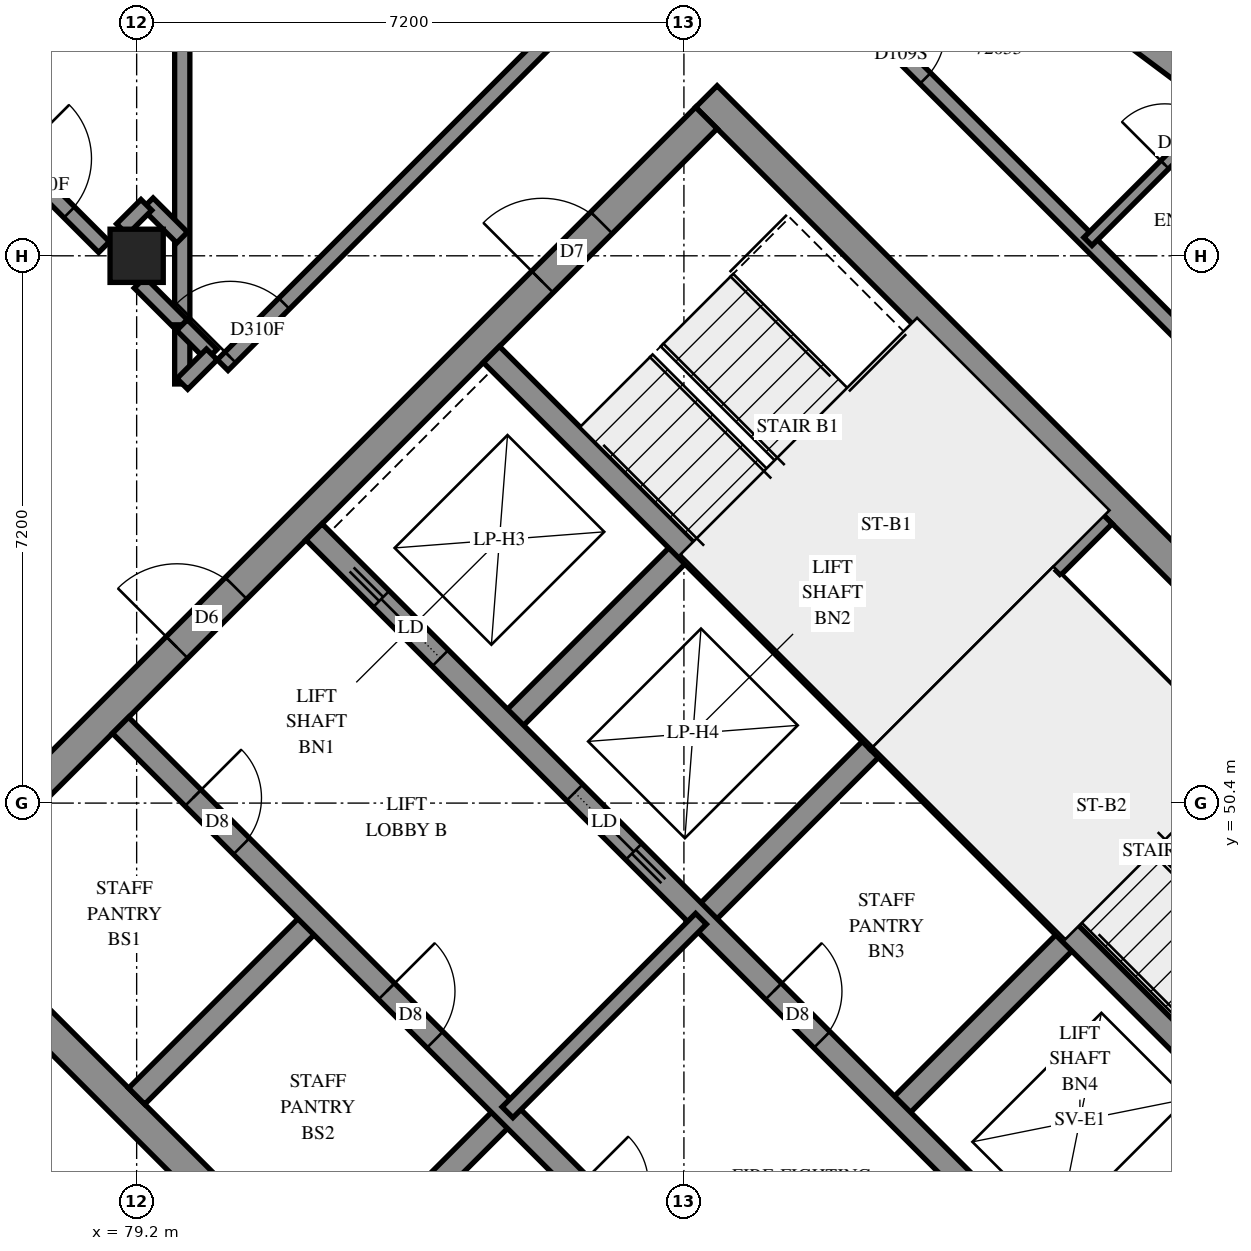
"""IFC4 building model, lengths in metres.
Left out: names, types, materials, properties, quantities, classifications, styles, units other than length and angle.
Written with IfcOpenShell. Run it as: python <this file> out.ifc"""

import sys

from ifc_helpers import new_model, si_unit, direction, frame, frame_2d, origin, origin_2d, place, context, subcontext, project, spatial, polyline, rectangle, outline, extrude, element, fill, save


model = new_model("IFC4")
c1 = context("Model", 3, precision=1e-05, world=origin(), true_north=direction((0.0, 1.0)))
c2 = subcontext(c1, "Body", "Model", "MODEL_VIEW")
j1 = project(units=[si_unit("LENGTHUNIT", "METRE"), si_unit("PLANEANGLEUNIT", "RADIAN")], contexts=[c1])
p1 = place(None, origin())
s1 = spatial("IfcSite", under=j1, at=p1, CompositionType="ELEMENT")
p2 = place(p1, origin())
s2 = spatial("IfcBuilding", under=s1, at=p2, CompositionType="ELEMENT")
p3 = place(p2, frame((0.0, 0.0, 264.2)))
s3 = spatial("IfcBuildingStorey", under=s2, at=p3, CompositionType="ELEMENT", Elevation=264.2)
p4 = place(p3, frame((79.2, 57.6, 0.0), z_axis=(0.0, 0.0, 1.0), x_axis=(1.0, 0.0, 0.0)))
e1 = element("IfcColumn", 1, at=p4, inside=s3, PredefinedType="COLUMN", context=c2, shape_type="SweptSolid", body=[
    extrude(rectangle(XDim=0.7, YDim=0.7, at=origin_2d()), origin(), (0.0, 0.0, 1.0), 3.1),
])
p5 = place(p3, frame((76.23, 49.231, -0.3), z_axis=(0.0, 0.0, 1.0), x_axis=(0.7071034917, -0.7071100706, 0.0)))
e2 = element("IfcWall", 2, at=p5, inside=s3, PredefinedType="SHEAR", context=c2, shape_type="SweptSolid", body=[
    extrude(rectangle(XDim=15.2, YDim=0.4, at=frame_2d((7.6, 0.0))), origin(), (0.0, 0.0, 1.0), 2.7),
])
p6 = place(p3, frame((86.695, 59.696, -0.3), z_axis=(0.0, 0.0, 1.0), x_axis=(0.7071100706, -0.7071034917, 0.0)))
e3 = element("IfcWall", 3, at=p6, inside=s3, PredefinedType="SHEAR", context=c2, shape_type="SweptSolid", body=[
    extrude(rectangle(XDim=15.2, YDim=0.4, at=frame_2d((7.6, 0.0))), origin(), (0.0, 0.0, 1.0), 2.7),
])
p7 = place(p6, frame((10.4, 0.0, 0.3)))
e4 = element("IfcOpeningElement", 4, at=p7, cuts=e3, PredefinedType="OPENING", context=c2, shape_type="SweptSolid", body=[
    extrude(rectangle(XDim=0.8, YDim=2.1, at=frame_2d((0.4, 1.05))), frame((0.0, 0.21, 0.0), z_axis=(0.0, -1.0, 0.0), x_axis=(1.0, 0.0, 0.0)), (0.0, 0.0, 1.0), 0.42),
])
p8 = place(p3, frame((76.513, 49.231, -0.3), z_axis=(0.0, 0.0, 1.0), x_axis=(0.7071067812, 0.7071067812, 0.0)))
e5 = element("IfcWall", 5, at=p8, inside=s3, PredefinedType="SHEAR", context=c2, shape_type="SweptSolid", body=[
    extrude(rectangle(XDim=14.4, YDim=0.4, at=frame_2d((7.2, 0.0))), origin(), (0.0, 0.0, 1.0), 2.7),
])
p9 = place(p8, frame((4.55, 0.0, 0.3)))
e6 = element("IfcOpeningElement", 6, at=p9, cuts=e5, PredefinedType="OPENING", context=c2, shape_type="SweptSolid", body=[
    extrude(rectangle(XDim=1.1, YDim=2.1, at=frame_2d((0.55, 1.05))), frame((0.0, 0.21, 0.0), z_axis=(0.0, -1.0, 0.0), x_axis=(1.0, 0.0, 0.0)), (0.0, 0.0, 1.0), 0.42),
])
p10 = place(p8, frame((11.35, 0.0, 0.3)))
e7 = element("IfcOpeningElement", 7, at=p10, cuts=e5, PredefinedType="OPENING", context=c2, shape_type="SweptSolid", body=[
    extrude(rectangle(XDim=1.1, YDim=2.1, at=frame_2d((0.55, 1.05))), frame((0.0, 0.21, 0.0), z_axis=(0.0, -1.0, 0.0), x_axis=(1.0, 0.0, 0.0)), (0.0, 0.0, 1.0), 0.42),
])
p11 = place(p3, frame((86.978, 38.766, -0.3), z_axis=(0.0, 0.0, 1.0), x_axis=(0.7071067812, 0.7071067812, 0.0)))
e8 = element("IfcWall", 8, at=p11, inside=s3, PredefinedType="SHEAR", context=c2, shape_type="SweptSolid", body=[
    extrude(rectangle(XDim=14.4, YDim=0.4, at=frame_2d((7.2, 0.0))), origin(), (0.0, 0.0, 1.0), 2.7),
])
p12 = place(p11, frame((4.55, 0.0, 0.3)))
e9 = element("IfcOpeningElement", 9, at=p12, cuts=e8, PredefinedType="OPENING", context=c2, shape_type="SweptSolid", body=[
    extrude(rectangle(XDim=1.1, YDim=2.1, at=frame_2d((0.55, 1.05))), frame((0.0, 0.21, 0.0), z_axis=(0.0, -1.0, 0.0), x_axis=(1.0, 0.0, 0.0)), (0.0, 0.0, 1.0), 0.42),
])
p13 = place(p11, frame((11.35, 0.0, 0.3)))
e10 = element("IfcOpeningElement", 10, at=p13, cuts=e8, PredefinedType="OPENING", context=c2, shape_type="SweptSolid", body=[
    extrude(rectangle(XDim=1.1, YDim=2.1, at=frame_2d((0.55, 1.05))), frame((0.0, 0.21, 0.0), z_axis=(0.0, -1.0, 0.0), x_axis=(1.0, 0.0, 0.0)), (0.0, 0.0, 1.0), 0.42),
])
for number, where, z_axis, x_axis in (
    (11, (79.2, 46.544, 0.0), (0.0, 0.0, 1.0), (0.707, 0.707, 0.0)),
    (12, (84.079, 51.423, 0.0), (0.0, 0.0, 1.0), (0.707, 0.707, 0.0)),
):
    element("IfcWall", number, at=place(p3, frame(where, z_axis=z_axis, x_axis=x_axis)), inside=s3, PredefinedType="SOLIDWALL", context=c2, shape_type="SweptSolid", body=[
        extrude(rectangle(XDim=3.3, YDim=0.3, at=frame_2d((1.65, 0.0))), origin(), (0.0, 0.0, 1.0), 3.1),
    ])
p14 = place(p3, frame((81.746, 43.999, 0.0), z_axis=(0.0, 0.0, 1.0), x_axis=(0.7071067812, 0.7071067812, 0.0)))
e13 = element("IfcWall", 13, at=p14, inside=s3, PredefinedType="SOLIDWALL", context=c2, shape_type="SweptSolid", body=[
    extrude(rectangle(XDim=3.3, YDim=0.3, at=frame_2d((1.65, 0.0))), origin(), (0.0, 0.0, 1.0), 3.1),
])
for number, where, z_axis, x_axis in (
    (14, (86.625, 48.878, 0.0), (0.0, 0.0, 1.0), (0.707, 0.707, 0.0)),
    (15, (89.17, 46.332, 0.0), (0.0, 0.0, 1.0), (0.707, 0.707, 0.0)),
):
    element("IfcWall", number, at=place(p3, frame(where, z_axis=z_axis, x_axis=x_axis)), inside=s3, PredefinedType="SOLIDWALL", context=c2, shape_type="SweptSolid", body=[
        extrude(rectangle(XDim=3.3, YDim=0.3, at=frame_2d((1.65, 0.0))), origin(), (0.0, 0.0, 1.0), 3.1),
    ])
p15 = place(p3, frame((78.988, 51.423, 0.0), z_axis=(0.0, 0.0, 1.0), x_axis=(0.7071067812, -0.7071067812, 0.0)))
e16 = element("IfcWall", 16, at=p15, inside=s3, PredefinedType="SOLIDWALL", context=c2, shape_type="SweptSolid", body=[
    extrude(rectangle(XDim=14.4, YDim=0.3, at=frame_2d((7.2, 0.0))), origin(), (0.0, 0.0, 1.0), 3.1),
])
p16 = place(p15, frame((1.35, 0.0, 0.0)))
e17 = element("IfcOpeningElement", 17, at=p16, cuts=e16, PredefinedType="OPENING", context=c2, shape_type="SweptSolid", body=[
    extrude(rectangle(XDim=0.9, YDim=2.1, at=frame_2d((0.45, 1.05))), frame((0.0, 0.16, 0.0), z_axis=(0.0, -1.0, 0.0), x_axis=(1.0, 0.0, 0.0)), (0.0, 0.0, 1.0), 0.32),
])
p17 = place(p15, frame((4.95, 0.0, 0.0)))
e18 = element("IfcOpeningElement", 18, at=p17, cuts=e16, PredefinedType="OPENING", context=c2, shape_type="SweptSolid", body=[
    extrude(rectangle(XDim=0.9, YDim=2.1, at=frame_2d((0.45, 1.05))), frame((0.0, 0.16, 0.0), z_axis=(0.0, -1.0, 0.0), x_axis=(1.0, 0.0, 0.0)), (0.0, 0.0, 1.0), 0.32),
])
p18 = place(p15, frame((8.55, 0.0, 0.0)))
e19 = element("IfcOpeningElement", 19, at=p18, cuts=e16, PredefinedType="OPENING", context=c2, shape_type="SweptSolid", body=[
    extrude(rectangle(XDim=0.9, YDim=2.1, at=frame_2d((0.45, 1.05))), frame((0.0, 0.16, 0.0), z_axis=(0.0, -1.0, 0.0), x_axis=(1.0, 0.0, 0.0)), (0.0, 0.0, 1.0), 0.32),
])
p19 = place(p15, frame((12.05, 0.0, 0.0)))
e20 = element("IfcOpeningElement", 20, at=p19, cuts=e16, PredefinedType="OPENING", context=c2, shape_type="SweptSolid", body=[
    extrude(rectangle(XDim=1.1, YDim=2.1, at=frame_2d((0.55, 1.05))), frame((0.0, 0.16, 0.0), z_axis=(0.0, -1.0, 0.0), x_axis=(1.0, 0.0, 0.0)), (0.0, 0.0, 1.0), 0.32),
])
p20 = place(p3, frame((81.534, 53.969, 0.0), z_axis=(0.0, 0.0, 1.0), x_axis=(0.707103309, -0.7071102534, 0.0)))
e21 = element("IfcWall", 21, at=p20, inside=s3, PredefinedType="SOLIDWALL", context=c2, shape_type="SweptSolid", body=[
    extrude(rectangle(XDim=14.4, YDim=0.3, at=frame_2d((7.2, 0.0))), origin(), (0.0, 0.0, 1.0), 3.1),
])
p21 = place(p20, frame((8.55, 0.0, 0.0)))
e22 = element("IfcOpeningElement", 22, at=p21, cuts=e21, PredefinedType="OPENING", context=c2, shape_type="SweptSolid", body=[
    extrude(rectangle(XDim=0.9, YDim=2.1, at=frame_2d((0.45, 1.05))), frame((0.0, 0.16, 0.0), z_axis=(0.0, -1.0, 0.0), x_axis=(1.0, 0.0, 0.0)), (0.0, 0.0, 1.0), 0.32),
])
p22 = place(p20, frame((1.25, 0.0, 0.0)))
e23 = element("IfcOpeningElement", 23, at=p22, cuts=e21, PredefinedType="OPENING", context=c2, shape_type="SweptSolid", body=[
    extrude(rectangle(XDim=1.1, YDim=2.1, at=frame_2d((0.55, 1.05))), frame((0.0, 0.16, 0.0), z_axis=(0.0, -1.0, 0.0), x_axis=(1.0, 0.0, 0.0)), (0.0, 0.0, 1.0), 0.32),
])
p23 = place(p20, frame((4.85, 0.0, 0.0)))
e24 = element("IfcOpeningElement", 24, at=p23, cuts=e21, PredefinedType="OPENING", context=c2, shape_type="SweptSolid", body=[
    extrude(rectangle(XDim=1.1, YDim=2.1, at=frame_2d((0.55, 1.05))), frame((0.0, 0.16, 0.0), z_axis=(0.0, -1.0, 0.0), x_axis=(1.0, 0.0, 0.0)), (0.0, 0.0, 1.0), 0.32),
])
p24 = place(p20, frame((12.05, 0.0, 0.0)))
e25 = element("IfcOpeningElement", 25, at=p24, cuts=e21, PredefinedType="OPENING", context=c2, shape_type="SweptSolid", body=[
    extrude(rectangle(XDim=1.1, YDim=2.1, at=frame_2d((0.55, 1.05))), frame((0.0, 0.16, 0.0), z_axis=(0.0, -1.0, 0.0), x_axis=(1.0, 0.0, 0.0)), (0.0, 0.0, 1.0), 0.32),
])
for number, where, z_axis, x_axis in (
    (26, (83.867, 56.302, 0.0), (0.0, 0.0, 1.0), (0.707, -0.707, 0.0)),
    (27, (88.958, 51.211, 0.0), (0.0, 0.0, 1.0), (0.707, -0.707, 0.0)),
):
    element("IfcWall", number, at=place(p3, frame(where, z_axis=z_axis, x_axis=x_axis)), inside=s3, PredefinedType="SOLIDWALL", context=c2, shape_type="SweptSolid", body=[
        extrude(rectangle(XDim=7.2, YDim=0.3, at=frame_2d((3.6, 0.0))), origin(), (0.0, 0.0, 1.0), 3.1),
    ])
p25 = place(p3, frame((88.958, 51.211, 0.0), z_axis=(0.0, 0.0, 1.0), x_axis=(0.7071067812, 0.7071067812, 0.0)))
e28 = element("IfcWall", 28, at=p25, inside=s3, PredefinedType="SOLIDWALL", context=c2, shape_type="SweptSolid", body=[
    extrude(rectangle(XDim=4.2, YDim=0.3, at=frame_2d((2.1, 0.0))), origin(), (0.0, 0.0, 1.0), 3.1),
])
p26 = place(p3, frame((93.707, 59.55, 0.0), z_axis=(0.0, 0.0, 1.0), x_axis=(-0.8009854957, 0.5986837527, 0.0)))
e29 = element("IfcWall", 29, at=p26, inside=s3, PredefinedType="SOLIDWALL", context=c2, shape_type="SweptSolid", body=[
    extrude(outline(polyline([(-0.033, -0.225), (3.337, -0.225), (3.402, 0.225), (0.033, 0.225), (-0.033, -0.225)])), origin(), (0.0, 0.0, 1.0), 3.1),
])
p27 = place(p26, frame((1.521, 0.0, 0.45)))
e30 = element("IfcOpeningElement", 30, at=p27, cuts=e29, PredefinedType="OPENING", context=c2, shape_type="SweptSolid", body=[
    extrude(rectangle(XDim=1.2, YDim=2.55, at=frame_2d((0.6, 1.275))), frame((0.0, 0.235, 0.0), z_axis=(0.0, -1.0, 0.0), x_axis=(1.0, 0.0, 0.0)), (0.0, 0.0, 1.0), 0.47),
])
p28 = place(p3, frame((91.313, 53.354, 0.0), z_axis=(0.0, 0.0, 1.0), x_axis=(0.7071067812, -0.7071067812, 0.0)))
e31 = element("IfcWall", 31, at=p28, inside=s3, PredefinedType="PARTITIONING", context=c2, shape_type="SweptSolid", body=[
    extrude(rectangle(XDim=5.95, YDim=0.15, at=frame_2d((2.975, 0.0))), origin(), (0.0, 0.0, 1.0), 3.1),
])
p29 = place(p3, frame((84.079, 46.332, 0.0), z_axis=(0.0, 0.0, 1.0), x_axis=(0.7071067812, 0.7071067812, 0.0)))
e32 = element("IfcWall", 32, at=p29, inside=s3, PredefinedType="PARTITIONING", context=c2, shape_type="SweptSolid", body=[
    extrude(rectangle(XDim=3.6, YDim=0.2, at=frame_2d((1.8, 0.0))), origin(), (0.0, 0.0, 1.0), 3.1),
])
p30 = place(p3, frame((79.8, 56.692, 0.0), z_axis=(0.0, 0.0, 1.0), x_axis=(0.0, 1.0, 0.0)))
e33 = element("IfcWall", 33, at=p30, inside=s3, PredefinedType="PARTITIONING", context=c2, shape_type="SweptSolid", body=[
    extrude(rectangle(XDim=16.308, YDim=0.2, at=frame_2d((8.154, 0.0))), origin(), (0.0, 0.0, 1.0), 3.1),
])
p31 = place(p3, frame((80.332, 56.163, 0.0), z_axis=(0.0, 0.0, 1.0), x_axis=(0.7071067812, 0.7071067812, 0.0)))
e34 = element("IfcWall", 34, at=p31, inside=s3, PredefinedType="PARTITIONING", context=c2, shape_type="SweptSolid", body=[
    extrude(rectangle(XDim=9.198, YDim=0.2, at=frame_2d((4.599, 0.0))), origin(), (0.0, 0.0, 1.0), 3.1),
])
p32 = place(p31, frame((0.144, 0.0, 0.0)))
e35 = element("IfcOpeningElement", 35, at=p32, cuts=e34, PredefinedType="OPENING", context=c2, shape_type="SweptSolid", body=[
    extrude(rectangle(XDim=1.0, YDim=2.1, at=frame_2d((0.5, 1.05))), frame((0.0, 0.11, 0.0), z_axis=(0.0, -1.0, 0.0), x_axis=(1.0, 0.0, 0.0)), (0.0, 0.0, 1.0), 0.22),
])
p33 = place(p3, frame((86.841, 62.669, 0.0), z_axis=(0.0, 0.0, 1.0), x_axis=(0.7071067812, -0.7071067812, 0.0)))
e36 = element("IfcWall", 36, at=p33, inside=s3, PredefinedType="PARTITIONING", context=c2, shape_type="SweptSolid", body=[
    extrude(rectangle(XDim=8.799, YDim=0.2, at=frame_2d((4.4, 0.0))), origin(), (0.0, 0.0, 1.0), 3.1),
])
p34 = place(p33, frame((2.967, 0.0, 0.0)))
e37 = element("IfcOpeningElement", 37, at=p34, cuts=e36, PredefinedType="OPENING", context=c2, shape_type="SweptSolid", body=[
    extrude(rectangle(XDim=0.9, YDim=2.1, at=frame_2d((0.45, 1.05))), frame((0.0, 0.11, 0.0), z_axis=(0.0, -1.0, 0.0), x_axis=(1.0, 0.0, 0.0)), (0.0, 0.0, 1.0), 0.22),
])
p35 = place(p3, frame((76.269, 60.217, 0.0), z_axis=(0.0, 0.0, 1.0), x_axis=(0.7071067812, -0.7071067812, 0.0)))
e38 = element("IfcWall", 38, at=p35, inside=s3, PredefinedType="PARTITIONING", context=c2, shape_type="SweptSolid", body=[
    extrude(rectangle(XDim=3.538, YDim=0.2, at=frame_2d((1.769, 0.0))), origin(), (0.0, 0.0, 1.0), 3.1),
])
p36 = place(p35, frame((1.891, 0.0, 0.0)))
e39 = element("IfcOpeningElement", 39, at=p36, cuts=e38, PredefinedType="OPENING", context=c2, shape_type="SweptSolid", body=[
    extrude(rectangle(XDim=1.0, YDim=2.1, at=frame_2d((0.5, 1.05))), frame((0.0, 0.11, 0.0), z_axis=(0.0, -1.0, 0.0), x_axis=(1.0, 0.0, 0.0)), (0.0, 0.0, 1.0), 0.22),
])
p37 = place(p3, frame((91.716, 57.788, 0.0), z_axis=(0.0, 0.0, 1.0), x_axis=(0.7071067812, 0.7071067812, 0.0)))
e40 = element("IfcWall", 40, at=p37, inside=s3, PredefinedType="PARTITIONING", context=c2, shape_type="SweptSolid", body=[
    extrude(rectangle(XDim=2.403, YDim=0.15, at=frame_2d((1.202, 0.0))), origin(), (0.0, 0.0, 1.0), 3.1),
])
p38 = place(p37, frame((1.43, 0.0, 0.0)))
e41 = element("IfcOpeningElement", 41, at=p38, cuts=e40, PredefinedType="OPENING", context=c2, shape_type="SweptSolid", body=[
    extrude(rectangle(XDim=0.8, YDim=2.1, at=frame_2d((0.4, 1.05))), frame((0.0, 0.085, 0.0), z_axis=(0.0, -1.0, 0.0), x_axis=(1.0, 0.0, 0.0)), (0.0, 0.0, 1.0), 0.17),
])
p39 = place(p3, frame((79.239, 57.247, 0.0), z_axis=(0.0, 0.0, 1.0), x_axis=(0.7071067812, -0.7071067812, 0.0)))
e42 = element("IfcWall", 42, at=p39, inside=s3, PredefinedType="PARTITIONING", context=c2, shape_type="SweptSolid", body=[
    extrude(rectangle(XDim=0.789, YDim=0.2, at=frame_2d((0.395, 0.0))), origin(), (0.0, 0.0, 1.0), 3.1),
])
p40 = place(p3, frame((79.8, 55.914, 0.0), z_axis=(0.0, 0.0, 1.0), x_axis=(0.0, 1.0, 0.0)))
e43 = element("IfcWall", 43, at=p40, inside=s3, PredefinedType="PARTITIONING", context=c2, shape_type="SweptSolid", body=[
    extrude(rectangle(XDim=0.778, YDim=0.2, at=frame_2d((0.389, 0.0))), origin(), (0.0, 0.0, 1.0), 3.1),
])
p41 = place(p3, frame((79.346, 58.29, 0.0), z_axis=(0.0, 0.0, 1.0), x_axis=(0.7086729034, -0.7055371826, 0.0)))
e44 = element("IfcWall", 44, at=p41, inside=s3, PredefinedType="PARTITIONING", context=c2, shape_type="SweptSolid", body=[
    extrude(rectangle(XDim=0.638, YDim=0.2, at=frame_2d((0.319, 0.0))), origin(), (0.0, 0.0, 1.0), 3.1),
])
p42 = place(p3, frame((79.797, 56.689, 0.0), z_axis=(0.0, 0.0, 1.0), x_axis=(0.7071067812, -0.7071067812, 0.0)))
e45 = element("IfcWall", 45, at=p42, inside=s3, PredefinedType="PARTITIONING", context=c2, shape_type="SweptSolid", body=[
    extrude(rectangle(XDim=0.551, YDim=0.2, at=frame_2d((0.276, 0.0))), origin(), (0.0, 0.0, 1.0), 3.1),
])
p43 = place(p3, frame((79.801, 55.915, 0.0), z_axis=(0.0, 0.0, 1.0), x_axis=(0.7071067812, 0.7071067812, 0.0)))
e46 = element("IfcWall", 46, at=p43, inside=s3, PredefinedType="PARTITIONING", context=c2, shape_type="SweptSolid", body=[
    extrude(rectangle(XDim=0.549, YDim=0.2, at=frame_2d((0.274, 0.0))), origin(), (0.0, 0.0, 1.0), 3.1),
])
p44 = place(p3, frame((79.007, 57.949, 0.0), z_axis=(0.0, 0.0, 1.0), x_axis=(0.7071067812, 0.7071067812, 0.0)))
e47 = element("IfcWall", 47, at=p44, inside=s3, PredefinedType="PARTITIONING", context=c2, shape_type="SweptSolid", body=[
    extrude(rectangle(XDim=0.454, YDim=0.2, at=frame_2d((0.227, 0.0))), origin(), (0.0, 0.0, 1.0), 3.1),
])
p45 = place(p9, origin())
e48 = element("IfcDoor", 48, at=p45, inside=s3, OperationType="DOUBLE_DOOR_SINGLE_SWING", PredefinedType="DOOR", context=c2, shape_type="SweptSolid", body=[
    extrude(rectangle(XDim=1.1, YDim=2.1, at=frame_2d((0.55, 1.05))), frame((0.0, 0.025, 0.0), z_axis=(0.0, -1.0, 0.0), x_axis=(1.0, 0.0, 0.0)), (0.0, 0.0, 1.0), 0.05),
])
fill(e6, e48)
p46 = place(p10, origin())
e49 = element("IfcDoor", 49, at=p46, inside=s3, OperationType="SINGLE_SWING_LEFT", PredefinedType="DOOR", context=c2, shape_type="SweptSolid", body=[
    extrude(rectangle(XDim=1.1, YDim=2.1, at=frame_2d((0.55, 1.05))), frame((0.0, 0.025, 0.0), z_axis=(0.0, -1.0, 0.0), x_axis=(1.0, 0.0, 0.0)), (0.0, 0.0, 1.0), 0.05),
])
fill(e7, e49)
p47 = place(p16, origin())
e50 = element("IfcDoor", 50, at=p47, inside=s3, OperationType="SINGLE_SWING_LEFT", PredefinedType="DOOR", context=c2, shape_type="SweptSolid", body=[
    extrude(rectangle(XDim=0.9, YDim=2.1, at=frame_2d((0.45, 1.05))), frame((0.0, 0.025, 0.0), z_axis=(0.0, -1.0, 0.0), x_axis=(1.0, 0.0, 0.0)), (0.0, 0.0, 1.0), 0.05),
])
fill(e17, e50)
p48 = place(p17, origin())
e51 = element("IfcDoor", 51, at=p48, inside=s3, OperationType="SINGLE_SWING_LEFT", PredefinedType="DOOR", context=c2, shape_type="SweptSolid", body=[
    extrude(rectangle(XDim=0.9, YDim=2.1, at=frame_2d((0.45, 1.05))), frame((0.0, 0.025, 0.0), z_axis=(0.0, -1.0, 0.0), x_axis=(1.0, 0.0, 0.0)), (0.0, 0.0, 1.0), 0.05),
])
fill(e18, e51)
p49 = place(p21, origin())
e52 = element("IfcDoor", 52, at=p49, inside=s3, OperationType="SINGLE_SWING_LEFT", PredefinedType="DOOR", context=c2, shape_type="SweptSolid", body=[
    extrude(rectangle(XDim=0.9, YDim=2.1, at=frame_2d((0.45, 1.05))), frame((0.0, 0.025, 0.0), z_axis=(0.0, -1.0, 0.0), x_axis=(1.0, 0.0, 0.0)), (0.0, 0.0, 1.0), 0.05),
])
fill(e22, e52)
p50 = place(p22, origin())
e53 = element("IfcDoor", 53, at=p50, inside=s3, OperationType="SLIDING_TO_LEFT", PredefinedType="DOOR", context=c2, shape_type="SweptSolid", body=[
    extrude(rectangle(XDim=1.1, YDim=2.1, at=frame_2d((0.55, 1.05))), frame((0.0, 0.025, 0.0), z_axis=(0.0, -1.0, 0.0), x_axis=(1.0, 0.0, 0.0)), (0.0, 0.0, 1.0), 0.05),
])
fill(e23, e53)
p51 = place(p23, origin())
e54 = element("IfcDoor", 54, at=p51, inside=s3, OperationType="SLIDING_TO_RIGHT", PredefinedType="DOOR", context=c2, shape_type="SweptSolid", body=[
    extrude(rectangle(XDim=1.1, YDim=2.1, at=frame_2d((0.55, 1.05))), frame((0.0, 0.025, 0.0), z_axis=(0.0, -1.0, 0.0), x_axis=(1.0, 0.0, 0.0)), (0.0, 0.0, 1.0), 0.05),
])
fill(e24, e54)
p52 = place(p36, origin())
e55 = element("IfcDoor", 55, at=p52, inside=s3, OperationType="SINGLE_SWING_LEFT", PredefinedType="DOOR", context=c2, shape_type="SweptSolid", body=[
    extrude(rectangle(XDim=1.0, YDim=2.1, at=frame_2d((0.5, 1.05))), frame((0.0, 0.025, 0.0), z_axis=(0.0, -1.0, 0.0), x_axis=(1.0, 0.0, 0.0)), (0.0, 0.0, 1.0), 0.05),
])
fill(e39, e55)
p53 = place(p32, origin())
e56 = element("IfcDoor", 56, at=p53, inside=s3, OperationType="SINGLE_SWING_RIGHT", PredefinedType="DOOR", context=c2, shape_type="SweptSolid", body=[
    extrude(rectangle(XDim=1.0, YDim=2.1, at=frame_2d((0.5, 1.05))), frame((0.0, 0.025, 0.0), z_axis=(0.0, -1.0, 0.0), x_axis=(1.0, 0.0, 0.0)), (0.0, 0.0, 1.0), 0.05),
])
fill(e35, e56)
p54 = place(p34, origin())
e57 = element("IfcDoor", 57, at=p54, inside=s3, OperationType="SINGLE_SWING_LEFT", PredefinedType="DOOR", context=c2, shape_type="SweptSolid", body=[
    extrude(rectangle(XDim=0.9, YDim=2.1, at=frame_2d((0.45, 1.05))), frame((0.0, 0.025, 0.0), z_axis=(0.0, -1.0, 0.0), x_axis=(1.0, 0.0, 0.0)), (0.0, 0.0, 1.0), 0.05),
])
fill(e37, e57)
p55 = place(p38, origin())
e58 = element("IfcDoor", 58, at=p55, inside=s3, OperationType="SINGLE_SWING_RIGHT", PredefinedType="DOOR", context=c2, shape_type="SweptSolid", body=[
    extrude(rectangle(XDim=0.8, YDim=2.1, at=frame_2d((0.4, 1.05))), frame((0.0, 0.025, 0.0), z_axis=(0.0, -1.0, 0.0), x_axis=(1.0, 0.0, 0.0)), (0.0, 0.0, 1.0), 0.05),
])
fill(e41, e58)
save(model, sys.argv[1])
